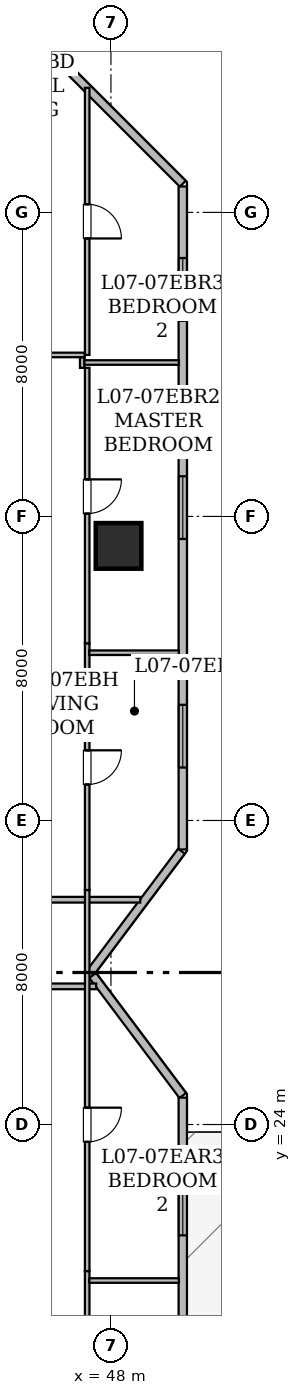
"""IFC4 building model, lengths in metres.
Left out: names, types, materials, properties, quantities, classifications, styles, units other than length and angle.
Written with IfcOpenShell. Run it as: python <this file> out.ifc"""

import sys

from ifc_helpers import new_model, si_unit, direction, frame, frame_2d, origin, origin_2d, place, context, subcontext, project, spatial, rectangle, hollow_rectangle, extrude, element, fill, save


model = new_model("IFC4")
c1 = context("Model", 3, precision=1e-05, world=origin(), true_north=direction((0.0, 1.0)))
c2 = subcontext(c1, "Body", "Model", "MODEL_VIEW")
j1 = project(units=[si_unit("LENGTHUNIT", "METRE"), si_unit("PLANEANGLEUNIT", "RADIAN")], contexts=[c1])
p1 = place(None, origin())
s1 = spatial("IfcSite", under=j1, at=p1, CompositionType="ELEMENT")
p2 = place(p1, origin())
s2 = spatial("IfcBuilding", under=s1, at=p2, CompositionType="ELEMENT")
p3 = place(p2, frame((0.0, 0.0, 33.3)))
s3 = spatial("IfcBuildingStorey", under=s2, at=p3, CompositionType="ELEMENT", Elevation=33.3)
p4 = place(p3, frame((48.2, 39.225, 0.025), z_axis=(0.0, 0.0, 1.0), x_axis=(1.0, 0.0, 0.0)))
e1 = element("IfcColumn", 1, at=p4, inside=s3, PredefinedType="COLUMN", context=c2, shape_type="SweptSolid", body=[
    extrude(hollow_rectangle(XDim=1.2, YDim=1.2, WallThickness=0.06, at=origin_2d()), origin(), (0.0, 0.0, 1.0), 3.625),
])
p5 = place(p3, frame((45.802, 52.842, 0.0), z_axis=(0.0, 0.0, 1.0), x_axis=(0.707085666273, -0.70712789547, 0.0)))
e2 = element("IfcWall", 2, at=p5, inside=s3, PredefinedType="STANDARD", context=c2, shape_type="SweptSolid", body=[
    extrude(rectangle(XDim=5.781, YDim=0.22, at=frame_2d((2.891, 0.0))), origin(), (0.0, 0.0, 1.0), 3.43),
])
p6 = place(p3, frame((49.89, 48.683, 0.0), z_axis=(0.0, 0.0, 1.0), x_axis=(0.0, -1.0, 0.0)))
e3 = element("IfcWall", 3, at=p6, inside=s3, PredefinedType="STANDARD", context=c2, shape_type="SweptSolid", body=[
    extrude(rectangle(XDim=17.446, YDim=0.22, at=frame_2d((8.723, 0.0))), origin(), (0.0, 0.0, 1.0), 3.43),
])
p7 = place(p6, frame((13.64, 0.0, 0.85)))
e4 = element("IfcOpeningElement", 4, at=p7, cuts=e3, PredefinedType="OPENING", context=c2, shape_type="SweptSolid", body=[
    extrude(rectangle(XDim=1.65, YDim=1.55, at=frame_2d((0.825, 0.775))), frame((0.0, 0.12, 0.0), z_axis=(0.0, -1.0, 0.0), x_axis=(1.0, 0.0, 0.0)), (0.0, 0.0, 1.0), 0.24),
])
p8 = place(p6, frame((7.626, 0.0, 0.85)))
e5 = element("IfcOpeningElement", 5, at=p8, cuts=e3, PredefinedType="OPENING", context=c2, shape_type="SweptSolid", body=[
    extrude(rectangle(XDim=1.65, YDim=1.55, at=frame_2d((0.825, 0.775))), frame((0.0, 0.12, 0.0), z_axis=(0.0, -1.0, 0.0), x_axis=(1.0, 0.0, 0.0)), (0.0, 0.0, 1.0), 0.24),
])
p9 = place(p6, frame((1.884, 0.0, 0.85)))
e6 = element("IfcOpeningElement", 6, at=p9, cuts=e3, PredefinedType="OPENING", context=c2, shape_type="SweptSolid", body=[
    extrude(rectangle(XDim=1.65, YDim=1.55, at=frame_2d((0.825, 0.775))), frame((0.0, 0.12, 0.0), z_axis=(0.0, -1.0, 0.0), x_axis=(1.0, 0.0, 0.0)), (0.0, 0.0, 1.0), 0.24),
])
p10 = place(p3, frame((49.856, 31.191, 0.0), z_axis=(0.0, 0.0, 1.0), x_axis=(-0.600137081448, -0.799897170561, 0.0)))
e7 = element("IfcWall", 7, at=p10, inside=s3, PredefinedType="STANDARD", context=c2, shape_type="SweptSolid", body=[
    extrude(rectangle(XDim=3.989, YDim=0.22, at=frame_2d((1.995, 0.0))), origin(), (0.0, 0.0, 1.0), 3.43),
])
p11 = place(p3, frame((47.519, 27.923, 0.0), z_axis=(0.0, 0.0, 1.0), x_axis=(0.600118645218, -0.799911002338, 0.0)))
e8 = element("IfcWall", 8, at=p11, inside=s3, PredefinedType="STANDARD", context=c2, shape_type="SweptSolid", body=[
    extrude(rectangle(XDim=3.951, YDim=0.22, at=frame_2d((1.975, 0.0))), origin(), (0.0, 0.0, 1.0), 3.43),
])
p12 = place(p3, frame((49.89, 24.707, 0.0), z_axis=(0.0, 0.0, 1.0), x_axis=(0.0, -1.0, 0.0)))
e9 = element("IfcWall", 9, at=p12, inside=s3, PredefinedType="STANDARD", context=c2, shape_type="SweptSolid", body=[
    extrude(rectangle(XDim=17.461, YDim=0.22, at=frame_2d((8.73, 0.0))), origin(), (0.0, 0.0, 1.0), 3.43),
])
p13 = place(p12, frame((11.566, 0.0, 0.0)))
e10 = element("IfcOpeningElement", 10, at=p13, cuts=e9, PredefinedType="OPENING", context=c2, shape_type="SweptSolid", body=[
    extrude(rectangle(XDim=1.1, YDim=2.2, at=frame_2d((0.55, 1.1))), frame((0.0, 0.12, 0.0), z_axis=(0.0, -1.0, 0.0), x_axis=(1.0, 0.0, 0.0)), (0.0, 0.0, 1.0), 0.24),
])
p14 = place(p12, frame((7.107, 0.0, 0.85)))
e11 = element("IfcOpeningElement", 11, at=p14, cuts=e9, PredefinedType="OPENING", context=c2, shape_type="SweptSolid", body=[
    extrude(rectangle(XDim=1.65, YDim=1.55, at=frame_2d((0.825, 0.775))), frame((0.0, 0.12, 0.0), z_axis=(0.0, -1.0, 0.0), x_axis=(1.0, 0.0, 0.0)), (0.0, 0.0, 1.0), 0.24),
])
p15 = place(p12, frame((1.973, 0.0, 0.85)))
e12 = element("IfcOpeningElement", 12, at=p15, cuts=e9, PredefinedType="OPENING", context=c2, shape_type="SweptSolid", body=[
    extrude(rectangle(XDim=1.65, YDim=1.55, at=frame_2d((0.825, 0.775))), frame((0.0, 0.12, 0.0), z_axis=(0.0, -1.0, 0.0), x_axis=(1.0, 0.0, 0.0)), (0.0, 0.0, 1.0), 0.24),
])
p16 = place(p3, frame((47.611, 27.635, 0.0), z_axis=(0.0, 0.0, 1.0), x_axis=(-1.0, 0.0, 0.0)))
e13 = element("IfcWall", 13, at=p16, inside=s3, PredefinedType="STANDARD", context=c2, shape_type="SweptSolid", body=[
    extrude(rectangle(XDim=3.965, YDim=0.15, at=frame_2d((1.982, 0.0))), origin(), (0.0, 0.0, 1.0), 2.647),
])
p17 = place(p16, frame((1.476, 0.0, 0.0)))
e14 = element("IfcOpeningElement", 14, at=p17, cuts=e13, PredefinedType="OPENING", context=c2, shape_type="SweptSolid", body=[
    extrude(rectangle(XDim=1.0, YDim=2.15, at=frame_2d((0.5, 1.075))), frame((0.0, 0.085, 0.0), z_axis=(0.0, -1.0, 0.0), x_axis=(1.0, 0.0, 0.0)), (0.0, 0.0, 1.0), 0.17),
])
p18 = place(p3, frame((43.646, 29.915, 0.0), z_axis=(0.0, 0.0, 1.0), x_axis=(1.0, 0.0, 0.0)))
e15 = element("IfcWall", 15, at=p18, inside=s3, PredefinedType="STANDARD", context=c2, shape_type="SweptSolid", body=[
    extrude(rectangle(XDim=5.125, YDim=0.15, at=frame_2d((2.562, 0.0))), origin(), (0.0, 0.0, 1.0), 2.647),
])
p19 = place(p18, frame((1.489, 0.0, 0.0)))
e16 = element("IfcOpeningElement", 16, at=p19, cuts=e15, PredefinedType="OPENING", context=c2, shape_type="SweptSolid", body=[
    extrude(rectangle(XDim=1.0, YDim=2.15, at=frame_2d((0.5, 1.075))), frame((0.0, 0.085, 0.0), z_axis=(0.0, -1.0, 0.0), x_axis=(1.0, 0.0, 0.0)), (0.0, 0.0, 1.0), 0.17),
])
p20 = place(p3, frame((47.375, 20.144, 0.0), z_axis=(0.0, 0.0, 1.0), x_axis=(0.0, -1.0, 0.0)))
e17 = element("IfcWall", 17, at=p20, inside=s3, PredefinedType="PARTITIONING", context=c2, shape_type="SweptSolid", body=[
    extrude(rectangle(XDim=6.24, YDim=0.12, at=frame_2d((3.12, 0.0))), origin(), (0.0, 0.0, 1.0), 2.647),
])
p21 = place(p20, frame((1.699, 0.0, 0.0)))
e18 = element("IfcOpeningElement", 18, at=p21, cuts=e17, PredefinedType="OPENING", context=c2, shape_type="SweptSolid", body=[
    extrude(rectangle(XDim=0.9, YDim=2.1, at=frame_2d((0.45, 1.05))), frame((0.0, 0.07, 0.0), z_axis=(0.0, -1.0, 0.0), x_axis=(1.0, 0.0, 0.0)), (0.0, 0.0, 1.0), 0.14),
])
p22 = place(p3, frame((47.375, 30.17, 0.0), z_axis=(0.0, 0.0, 1.0), x_axis=(0.0, -1.0, 0.0)))
e19 = element("IfcWall", 19, at=p22, inside=s3, PredefinedType="PARTITIONING", context=c2, shape_type="SweptSolid", body=[
    extrude(rectangle(XDim=10.026, YDim=0.12, at=frame_2d((5.013, 0.0))), origin(), (0.0, 0.0, 1.0), 2.957),
])
p23 = place(p22, frame((5.727, 0.0, 0.0)))
e20 = element("IfcOpeningElement", 20, at=p23, cuts=e19, PredefinedType="OPENING", context=c2, shape_type="SweptSolid", body=[
    extrude(rectangle(XDim=0.9, YDim=2.1, at=frame_2d((0.45, 1.05))), frame((0.0, 0.07, 0.0), z_axis=(0.0, -1.0, 0.0), x_axis=(1.0, 0.0, 0.0)), (0.0, 0.0, 1.0), 0.14),
])
p24 = place(p3, frame((47.429, 19.895, 0.0), z_axis=(0.0, 0.0, 1.0), x_axis=(1.0, 0.0, 0.0)))
e21 = element("IfcWall", 21, at=p24, inside=s3, PredefinedType="PARTITIONING", context=c2, shape_type="SweptSolid", body=[
    extrude(rectangle(XDim=2.359, YDim=0.12, at=frame_2d((1.18, 0.0))), origin(), (0.0, 0.0, 1.0), 2.803),
])
p25 = place(p3, frame((43.949, 44.249, 0.0), z_axis=(0.0, 0.0, 1.0), x_axis=(1.0, 0.0, 0.0)))
e22 = element("IfcWall", 22, at=p25, inside=s3, PredefinedType="PARTITIONING", context=c2, shape_type="SweptSolid", body=[
    extrude(rectangle(XDim=3.361, YDim=0.12, at=frame_2d((1.681, 0.0))), origin(), (0.0, 0.0, 1.0), 2.647),
])
p26 = place(p25, frame((1.231, 0.0, 0.0)))
e23 = element("IfcOpeningElement", 23, at=p26, cuts=e22, PredefinedType="OPENING", context=c2, shape_type="SweptSolid", body=[
    extrude(rectangle(XDim=0.9, YDim=2.1, at=frame_2d((0.45, 1.05))), frame((0.0, 0.07, 0.0), z_axis=(0.0, -1.0, 0.0), x_axis=(1.0, 0.0, 0.0)), (0.0, 0.0, 1.0), 0.14),
])
p27 = place(p3, frame((47.245, 44.184, 0.0), z_axis=(0.0, 0.0, 1.0), x_axis=(0.0, -1.0, 0.0)))
e24 = element("IfcWall", 24, at=p27, inside=s3, PredefinedType="PARTITIONING", context=c2, shape_type="SweptSolid", body=[
    extrude(rectangle(XDim=0.275, YDim=0.12, at=frame_2d((0.138, 0.0))), origin(), (0.0, 0.0, 1.0), 3.43),
])
p28 = place(p3, frame((47.375, 36.663, 0.0), z_axis=(0.0, 0.0, 1.0), x_axis=(0.0, -1.0, 0.0)))
e25 = element("IfcWall", 25, at=p28, inside=s3, PredefinedType="PARTITIONING", context=c2, shape_type="SweptSolid", body=[
    extrude(rectangle(XDim=6.493, YDim=0.12, at=frame_2d((3.247, 0.0))), origin(), (0.0, 0.0, 1.0), 3.43),
])
p29 = place(p28, frame((2.817, 0.0, 0.0)))
e26 = element("IfcOpeningElement", 26, at=p29, cuts=e25, PredefinedType="OPENING", context=c2, shape_type="SweptSolid", body=[
    extrude(rectangle(XDim=0.9, YDim=2.1, at=frame_2d((0.45, 1.05))), frame((0.0, 0.07, 0.0), z_axis=(0.0, -1.0, 0.0), x_axis=(1.0, 0.0, 0.0)), (0.0, 0.0, 1.0), 0.14),
])
p30 = place(p3, frame((47.375, 43.909, 0.0), z_axis=(0.0, 0.0, 1.0), x_axis=(0.0, -1.0, 0.0)))
e27 = element("IfcWall", 27, at=p30, inside=s3, PredefinedType="PARTITIONING", context=c2, shape_type="SweptSolid", body=[
    extrude(rectangle(XDim=7.246, YDim=0.12, at=frame_2d((3.623, 0.0))), origin(), (0.0, 0.0, 1.0), 2.647),
])
p31 = place(p30, frame((2.934, 0.0, 0.0)))
e28 = element("IfcOpeningElement", 28, at=p31, cuts=e27, PredefinedType="OPENING", context=c2, shape_type="SweptSolid", body=[
    extrude(rectangle(XDim=0.9, YDim=2.1, at=frame_2d((0.45, 1.05))), frame((0.0, 0.07, 0.0), z_axis=(0.0, -1.0, 0.0), x_axis=(1.0, 0.0, 0.0)), (0.0, 0.0, 1.0), 0.14),
])
p32 = place(p3, frame((47.375, 51.278, 0.0), z_axis=(0.0, 0.0, 1.0), x_axis=(0.0, -1.0, 0.0)))
e29 = element("IfcWall", 29, at=p32, inside=s3, PredefinedType="PARTITIONING", context=c2, shape_type="SweptSolid", body=[
    extrude(rectangle(XDim=7.029, YDim=0.12, at=frame_2d((3.515, 0.0))), origin(), (0.0, 0.0, 1.0), 3.43),
])
p33 = place(p32, frame((3.064, 0.0, 0.0)))
e30 = element("IfcOpeningElement", 30, at=p33, cuts=e29, PredefinedType="OPENING", context=c2, shape_type="SweptSolid", body=[
    extrude(rectangle(XDim=0.9, YDim=2.1, at=frame_2d((0.45, 1.05))), frame((0.0, 0.07, 0.0), z_axis=(0.0, -1.0, 0.0), x_axis=(1.0, 0.0, 0.0)), (0.0, 0.0, 1.0), 0.14),
])
p34 = place(p3, frame((47.429, 36.414, 0.0), z_axis=(0.0, 0.0, 1.0), x_axis=(1.0, 0.0, 0.0)))
e31 = element("IfcWall", 31, at=p34, inside=s3, PredefinedType="PARTITIONING", context=c2, shape_type="SweptSolid", body=[
    extrude(rectangle(XDim=2.359, YDim=0.12, at=frame_2d((1.18, 0.0))), origin(), (0.0, 0.0, 1.0), 2.803),
])
p35 = place(p3, frame((47.299, 44.05, 0.0), z_axis=(0.0, 0.0, 1.0), x_axis=(1.0, 0.0, 0.0)))
e32 = element("IfcWall", 32, at=p35, inside=s3, PredefinedType="PARTITIONING", context=c2, shape_type="SweptSolid", body=[
    extrude(rectangle(XDim=2.489, YDim=0.12, at=frame_2d((1.245, 0.0))), origin(), (0.0, 0.0, 1.0), 3.43),
])
p36 = place(p15, origin())
e33 = element("IfcWindow", 33, at=p36, inside=s3, PartitioningType="SINGLE_PANEL", PredefinedType="WINDOW", context=c2, shape_type="SweptSolid", body=[
    extrude(rectangle(XDim=1.65, YDim=1.55, at=frame_2d((0.825, 0.775))), frame((0.0, 0.03, 0.0), z_axis=(0.0, -1.0, 0.0), x_axis=(1.0, 0.0, 0.0)), (0.0, 0.0, 1.0), 0.06),
])
fill(e12, e33)
p37 = place(p7, origin())
e34 = element("IfcWindow", 34, at=p37, inside=s3, PartitioningType="SINGLE_PANEL", PredefinedType="WINDOW", context=c2, shape_type="SweptSolid", body=[
    extrude(rectangle(XDim=1.65, YDim=1.55, at=frame_2d((0.825, 0.775))), frame((0.0, 0.03, 0.0), z_axis=(0.0, -1.0, 0.0), x_axis=(1.0, 0.0, 0.0)), (0.0, 0.0, 1.0), 0.06),
])
fill(e4, e34)
p38 = place(p8, origin())
e35 = element("IfcWindow", 35, at=p38, inside=s3, PartitioningType="SINGLE_PANEL", PredefinedType="WINDOW", context=c2, shape_type="SweptSolid", body=[
    extrude(rectangle(XDim=1.65, YDim=1.55, at=frame_2d((0.825, 0.775))), frame((0.0, 0.03, 0.0), z_axis=(0.0, -1.0, 0.0), x_axis=(1.0, 0.0, 0.0)), (0.0, 0.0, 1.0), 0.06),
])
fill(e5, e35)
p39 = place(p9, origin())
e36 = element("IfcWindow", 36, at=p39, inside=s3, PartitioningType="SINGLE_PANEL", PredefinedType="WINDOW", context=c2, shape_type="SweptSolid", body=[
    extrude(rectangle(XDim=1.65, YDim=1.55, at=frame_2d((0.825, 0.775))), frame((0.0, 0.03, 0.0), z_axis=(0.0, -1.0, 0.0), x_axis=(1.0, 0.0, 0.0)), (0.0, 0.0, 1.0), 0.06),
])
fill(e6, e36)
p40 = place(p23, origin())
e37 = element("IfcDoor", 37, at=p40, inside=s3, OperationType="SINGLE_SWING_LEFT", PredefinedType="DOOR", context=c2, shape_type="SweptSolid", body=[
    extrude(rectangle(XDim=0.9, YDim=2.1, at=frame_2d((0.45, 1.05))), frame((0.0, 0.025, 0.0), z_axis=(0.0, -1.0, 0.0), x_axis=(1.0, 0.0, 0.0)), (0.0, 0.0, 1.0), 0.05),
])
fill(e20, e37)
p41 = place(p29, origin())
e38 = element("IfcDoor", 38, at=p41, inside=s3, OperationType="SINGLE_SWING_LEFT", PredefinedType="DOOR", context=c2, shape_type="SweptSolid", body=[
    extrude(rectangle(XDim=0.9, YDim=2.1, at=frame_2d((0.45, 1.05))), frame((0.0, 0.025, 0.0), z_axis=(0.0, -1.0, 0.0), x_axis=(1.0, 0.0, 0.0)), (0.0, 0.0, 1.0), 0.05),
])
fill(e26, e38)
p42 = place(p31, origin())
e39 = element("IfcDoor", 39, at=p42, inside=s3, OperationType="SINGLE_SWING_LEFT", PredefinedType="DOOR", context=c2, shape_type="SweptSolid", body=[
    extrude(rectangle(XDim=0.9, YDim=2.1, at=frame_2d((0.45, 1.05))), frame((0.0, 0.025, 0.0), z_axis=(0.0, -1.0, 0.0), x_axis=(1.0, 0.0, 0.0)), (0.0, 0.0, 1.0), 0.05),
])
fill(e28, e39)
p43 = place(p33, origin())
e40 = element("IfcDoor", 40, at=p43, inside=s3, OperationType="SINGLE_SWING_RIGHT", PredefinedType="DOOR", context=c2, shape_type="SweptSolid", body=[
    extrude(rectangle(XDim=0.9, YDim=2.1, at=frame_2d((0.45, 1.05))), frame((0.0, 0.025, 0.0), z_axis=(0.0, -1.0, 0.0), x_axis=(1.0, 0.0, 0.0)), (0.0, 0.0, 1.0), 0.05),
])
fill(e30, e40)
save(model, sys.argv[1])
